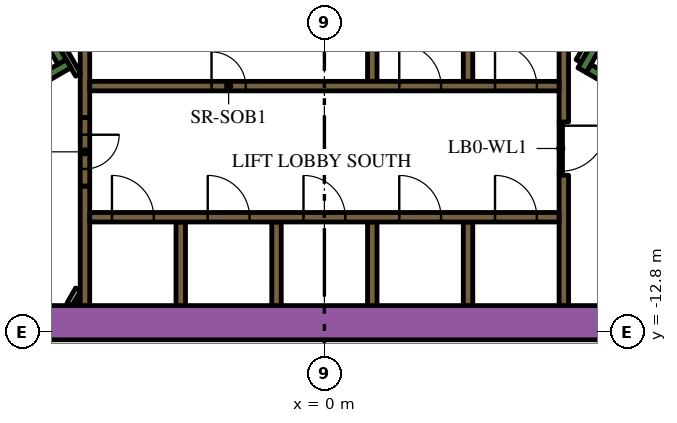
"""IFC4 building model, lengths in metres.
Left out: names, types, materials, properties, quantities, classifications, styles, units other than length and angle.
Written with IfcOpenShell. Run it as: python <this file> out.ifc"""

import sys

from ifc_helpers import new_model, si_unit, direction, frame, frame_2d, origin, place, context, subcontext, project, spatial, rectangle, extrude, element, fill, save


model = new_model("IFC4")
c1 = context("Model", 3, precision=1e-05, world=origin(), true_north=direction((0.0, 1.0)))
c2 = subcontext(c1, "Body", "Model", "MODEL_VIEW")
j1 = project(units=[si_unit("LENGTHUNIT", "METRE"), si_unit("PLANEANGLEUNIT", "RADIAN")], contexts=[c1])
p1 = place(None, origin())
s1 = spatial("IfcSite", under=j1, at=p1, CompositionType="ELEMENT")
p2 = place(p1, origin())
s2 = spatial("IfcBuilding", under=s1, at=p2, CompositionType="ELEMENT")
p3 = place(p2, frame((0.0, 0.0, 95.4)))
s3 = spatial("IfcBuildingStorey", under=s2, at=p3, CompositionType="ELEMENT", Elevation=95.4)
p4 = place(p3, frame((-12.019, -12.55, 0.0), z_axis=(0.0, 0.0, 1.0), x_axis=(1.0, 0.0, 0.0)))
e1 = element("IfcWall", 1, at=p4, inside=s3, PredefinedType="SOLIDWALL", context=c2, shape_type="SweptSolid", body=[
    extrude(rectangle(XDim=21.63, YDim=0.9, at=frame_2d((10.815, 0.0))), origin(), (0.0, 0.0, 1.0), 3.9),
])
p5 = place(p3, frame((12.84, -9.261, 0.0), z_axis=(0.0, 0.0, 1.0), x_axis=(-0.866013990052, 0.500019768644, 0.0)))
e2 = element("IfcWall", 2, at=p5, inside=s3, PredefinedType="SOLIDWALL", context=c2, shape_type="SweptSolid", body=[
    extrude(rectangle(XDim=6.8, YDim=0.25, at=frame_2d((3.4, 0.0))), origin(), (0.0, 0.0, 1.0), 3.9),
])
p6 = place(p3, frame((6.78, -5.906, 0.0), z_axis=(0.0, 0.0, 1.0), x_axis=(0.500223362819, 0.865896406789, 0.0)))
e3 = element("IfcWall", 3, at=p6, inside=s3, PredefinedType="SOLIDWALL", context=c2, shape_type="SweptSolid", body=[
    extrude(rectangle(XDim=0.675, YDim=0.25, at=frame_2d((0.337, 0.0))), origin(), (0.0, 0.0, 1.0), 3.9),
])
p7 = place(p3, frame((-12.84, -9.261, 0.0), z_axis=(0.0, 0.0, 1.0), x_axis=(0.866016039709, 0.500016218704, 0.0)))
e4 = element("IfcWall", 4, at=p7, inside=s3, PredefinedType="SOLIDWALL", context=c2, shape_type="SweptSolid", body=[
    extrude(rectangle(XDim=7.05, YDim=0.25, at=frame_2d((3.525, 0.0))), origin(), (0.0, 0.0, 1.0), 3.9),
])
p8 = place(p3, frame((-6.905, -5.69, 0.0), z_axis=(0.0, 0.0, 1.0), x_axis=(-0.500402024738, 0.865793170242, 0.0)))
e5 = element("IfcWall", 5, at=p8, inside=s3, PredefinedType="SOLIDWALL", context=c2, shape_type="SweptSolid", body=[
    extrude(rectangle(XDim=0.425, YDim=0.25, at=frame_2d((0.212, 0.0))), origin(), (0.0, 0.0, 1.0), 3.9),
])
p9 = place(p3, frame((-3.78, -12.1, 0.0), z_axis=(0.0, 0.0, 1.0), x_axis=(0.0, 1.0, 0.0)))
e6 = element("IfcWall", 6, at=p9, inside=s3, PredefinedType="SOLIDWALL", context=c2, shape_type="SweptSolid", body=[
    extrude(rectangle(XDim=2.2, YDim=0.25, at=frame_2d((1.1, 0.0))), origin(), (0.0, 0.0, 1.0), 3.9),
])
p10 = place(p3, frame((-6.3, -12.1, 0.0), z_axis=(0.0, 0.0, 1.0), x_axis=(0.0, 1.0, 0.0)))
e7 = element("IfcWall", 7, at=p10, inside=s3, PredefinedType="SOLIDWALL", context=c2, shape_type="SweptSolid", body=[
    extrude(rectangle(XDim=3.146, YDim=0.25, at=frame_2d((1.573, 0.0))), origin(), (0.0, 0.0, 1.0), 3.9),
])
p11 = place(p3, frame((6.3, -8.67, 0.0), z_axis=(0.0, 0.0, 1.0), x_axis=(0.0, -1.0, 0.0)))
e8 = element("IfcWall", 8, at=p11, inside=s3, PredefinedType="SOLIDWALL", context=c2, shape_type="SweptSolid", body=[
    extrude(rectangle(XDim=3.43, YDim=0.25, at=frame_2d((1.715, 0.0))), origin(), (0.0, 0.0, 1.0), 3.9),
])
p12 = place(p3, frame((6.3, -7.268, 0.0), z_axis=(0.0, 0.0, 1.0), x_axis=(0.0, 1.0, 0.0)))
e9 = element("IfcWall", 9, at=p12, inside=s3, PredefinedType="SOLIDWALL", context=c2, shape_type="SweptSolid", body=[
    extrude(rectangle(XDim=3.268, YDim=0.25, at=frame_2d((1.634, 0.0))), origin(), (0.0, 0.0, 1.0), 3.9),
])
for number, where, z_axis, x_axis in (
    (10, (3.78, -4.0, 0.0), (0.0, 0.0, 1.0), (0.0, -1.0, 0.0)),
    (11, (1.26, -4.0, 0.0), (0.0, 0.0, 1.0), (0.0, -1.0, 0.0)),
):
    element("IfcWall", number, at=place(p3, frame(where, z_axis=z_axis, x_axis=x_axis)), inside=s3, PredefinedType="SOLIDWALL", context=c2, shape_type="SweptSolid", body=[
        extrude(rectangle(XDim=2.2, YDim=0.25, at=frame_2d((1.1, 0.0))), origin(), (0.0, 0.0, 1.0), 3.9),
    ])
p13 = place(p3, frame((-6.3, -4.0, 0.0), z_axis=(0.0, 0.0, 1.0), x_axis=(0.0, -1.0, 0.0)))
e12 = element("IfcWall", 12, at=p13, inside=s3, PredefinedType="SOLIDWALL", context=c2, shape_type="SweptSolid", body=[
    extrude(rectangle(XDim=3.154, YDim=0.25, at=frame_2d((1.577, 0.0))), origin(), (0.0, 0.0, 1.0), 3.9),
])
for number, where, z_axis, x_axis in (
    (13, (3.78, -12.1, 0.0), (0.0, 0.0, 1.0), (0.0, 1.0, 0.0)),
    (14, (1.26, -12.1, 0.0), (0.0, 0.0, 1.0), (0.0, 1.0, 0.0)),
    (15, (-1.26, -12.1, 0.0), (0.0, 0.0, 1.0), (0.0, 1.0, 0.0)),
):
    element("IfcWall", number, at=place(p3, frame(where, z_axis=z_axis, x_axis=x_axis)), inside=s3, PredefinedType="SOLIDWALL", context=c2, shape_type="SweptSolid", body=[
        extrude(rectangle(XDim=2.2, YDim=0.25, at=frame_2d((1.1, 0.0))), origin(), (0.0, 0.0, 1.0), 3.9),
    ])
p14 = place(p3, frame((-6.708, -12.068, 0.0), z_axis=(0.0, 0.0, 1.0), x_axis=(0.500000789788, 0.8660249478, 0.0)))
e16 = element("IfcWall", 16, at=p14, inside=s3, PredefinedType="PARTITIONING", context=c2, shape_type="SweptSolid", body=[
    extrude(rectangle(XDim=0.456, YDim=0.15, at=frame_2d((0.228, 0.0))), origin(), (0.0, 0.0, 1.0), 2.75),
])
p15 = place(p3, frame((-6.534, -12.068, 0.0), z_axis=(0.0, 0.0, 1.0), x_axis=(0.500240224089, 0.865886665912, 0.0)))
e17 = element("IfcWall", 17, at=p15, inside=s3, PredefinedType="PARTITIONING", context=c2, shape_type="SweptSolid", body=[
    extrude(rectangle(XDim=0.109, YDim=0.15, at=frame_2d((0.054, 0.0))), origin(), (0.0, 0.0, 1.0), 2.75),
])
p16 = place(p3, frame((-6.48, -6.027, 0.0), z_axis=(0.0, 0.0, 1.0), x_axis=(-0.499927229454, 0.866067413802, 0.0)))
e18 = element("IfcWall", 18, at=p16, inside=s3, PredefinedType="PARTITIONING", context=c2, shape_type="SweptSolid", body=[
    extrude(rectangle(XDim=0.929, YDim=0.15, at=frame_2d((0.464, 0.0))), origin(), (0.0, 0.0, 1.0), 3.9),
])
p17 = place(p3, frame((6.945, -5.222, 0.0), z_axis=(0.0, 0.0, 1.0), x_axis=(-0.499818422106, -0.866130212453, 0.0)))
e19 = element("IfcWall", 19, at=p17, inside=s3, PredefinedType="PARTITIONING", context=c2, shape_type="SweptSolid", body=[
    extrude(rectangle(XDim=0.514, YDim=0.15, at=frame_2d((0.257, 0.0))), origin(), (0.0, 0.0, 1.0), 2.75),
])
p18 = place(p3, frame((-6.175, -9.775, 0.0), z_axis=(0.0, 0.0, 1.0), x_axis=(1.0, 0.0, 0.0)))
e20 = element("IfcWall", 20, at=p18, inside=s3, PredefinedType="SOLIDWALL", context=c2, shape_type="SweptSolid", body=[
    extrude(rectangle(XDim=12.35, YDim=0.25, at=frame_2d((6.175, 0.0))), origin(), (0.0, 0.0, 1.0), 3.9),
])
p19 = place(p18, frame((0.585, 0.0, 0.0)))
e21 = element("IfcOpeningElement", 21, at=p19, cuts=e20, PredefinedType="OPENING", context=c2, shape_type="SweptSolid", body=[
    extrude(rectangle(XDim=1.1, YDim=2.1, at=frame_2d((0.55, 1.05))), frame((0.0, 0.135, 0.0), z_axis=(0.0, -1.0, 0.0), x_axis=(1.0, 0.0, 0.0)), (0.0, 0.0, 1.0), 0.27),
])
p20 = place(p18, frame((3.105, 0.0, 0.0)))
e22 = element("IfcOpeningElement", 22, at=p20, cuts=e20, PredefinedType="OPENING", context=c2, shape_type="SweptSolid", body=[
    extrude(rectangle(XDim=1.1, YDim=2.1, at=frame_2d((0.55, 1.05))), frame((0.0, 0.135, 0.0), z_axis=(0.0, -1.0, 0.0), x_axis=(1.0, 0.0, 0.0)), (0.0, 0.0, 1.0), 0.27),
])
p21 = place(p18, frame((5.625, 0.0, 0.0)))
e23 = element("IfcOpeningElement", 23, at=p21, cuts=e20, PredefinedType="OPENING", context=c2, shape_type="SweptSolid", body=[
    extrude(rectangle(XDim=1.1, YDim=2.1, at=frame_2d((0.55, 1.05))), frame((0.0, 0.135, 0.0), z_axis=(0.0, -1.0, 0.0), x_axis=(1.0, 0.0, 0.0)), (0.0, 0.0, 1.0), 0.27),
])
p22 = place(p18, frame((8.145, 0.0, 0.0)))
e24 = element("IfcOpeningElement", 24, at=p22, cuts=e20, PredefinedType="OPENING", context=c2, shape_type="SweptSolid", body=[
    extrude(rectangle(XDim=1.1, YDim=2.1, at=frame_2d((0.55, 1.05))), frame((0.0, 0.135, 0.0), z_axis=(0.0, -1.0, 0.0), x_axis=(1.0, 0.0, 0.0)), (0.0, 0.0, 1.0), 0.27),
])
p23 = place(p18, frame((10.665, 0.0, 0.0)))
e25 = element("IfcOpeningElement", 25, at=p23, cuts=e20, PredefinedType="OPENING", context=c2, shape_type="SweptSolid", body=[
    extrude(rectangle(XDim=1.1, YDim=2.1, at=frame_2d((0.55, 1.05))), frame((0.0, 0.135, 0.0), z_axis=(0.0, -1.0, 0.0), x_axis=(1.0, 0.0, 0.0)), (0.0, 0.0, 1.0), 0.27),
])
p24 = place(p3, frame((-6.175, -6.325, 0.0), z_axis=(0.0, 0.0, 1.0), x_axis=(1.0, 0.0, 0.0)))
e26 = element("IfcWall", 26, at=p24, inside=s3, PredefinedType="SOLIDWALL", context=c2, shape_type="SweptSolid", body=[
    extrude(rectangle(XDim=12.35, YDim=0.25, at=frame_2d((6.175, 0.0))), origin(), (0.0, 0.0, 1.0), 3.9),
])
p25 = place(p24, frame((3.205, 0.0, 0.0)))
e27 = element("IfcOpeningElement", 27, at=p25, cuts=e26, PredefinedType="OPENING", context=c2, shape_type="SweptSolid", body=[
    extrude(rectangle(XDim=0.9, YDim=2.1, at=frame_2d((0.45, 1.05))), frame((0.0, 0.135, 0.0), z_axis=(0.0, -1.0, 0.0), x_axis=(1.0, 0.0, 0.0)), (0.0, 0.0, 1.0), 0.27),
])
p26 = place(p24, frame((8.145, 0.0, 0.0)))
e28 = element("IfcOpeningElement", 28, at=p26, cuts=e26, PredefinedType="OPENING", context=c2, shape_type="SweptSolid", body=[
    extrude(rectangle(XDim=1.1, YDim=2.1, at=frame_2d((0.55, 1.05))), frame((0.0, 0.135, 0.0), z_axis=(0.0, -1.0, 0.0), x_axis=(1.0, 0.0, 0.0)), (0.0, 0.0, 1.0), 0.27),
])
p27 = place(p24, frame((10.665, 0.0, 0.0)))
e29 = element("IfcOpeningElement", 29, at=p27, cuts=e26, PredefinedType="OPENING", context=c2, shape_type="SweptSolid", body=[
    extrude(rectangle(XDim=1.1, YDim=2.1, at=frame_2d((0.55, 1.05))), frame((0.0, 0.135, 0.0), z_axis=(0.0, -1.0, 0.0), x_axis=(1.0, 0.0, 0.0)), (0.0, 0.0, 1.0), 0.27),
])
p28 = place(p3, frame((-6.3, -7.154, 0.0), z_axis=(0.0, 0.0, 1.0), x_axis=(0.0, -1.0, 0.0)))
e30 = element("IfcWall", 30, at=p28, inside=s3, PredefinedType="SOLIDWALL", context=c2, shape_type="SweptSolid", body=[
    extrude(rectangle(XDim=1.8, YDim=0.25, at=frame_2d((0.9, 0.0))), origin(), (0.0, 0.0, 1.0), 3.9),
])
p29 = place(p28, frame((0.45, 0.0, 0.0)))
e31 = element("IfcOpeningElement", 31, at=p29, cuts=e30, PredefinedType="OPENING", context=c2, shape_type="SweptSolid", body=[
    extrude(rectangle(XDim=0.9, YDim=2.1, at=frame_2d((0.45, 1.05))), frame((0.0, 0.135, 0.0), z_axis=(0.0, -1.0, 0.0), x_axis=(1.0, 0.0, 0.0)), (0.0, 0.0, 1.0), 0.27),
])
p30 = place(p3, frame((6.22, -7.266, 0.0), z_axis=(0.0, 0.0, 1.0), x_axis=(0.0, -1.0, 0.0)))
e32 = element("IfcWall", 32, at=p30, inside=s3, PredefinedType="PARTITIONING", context=c2, shape_type="SweptSolid", body=[
    extrude(rectangle(XDim=1.4, YDim=0.09, at=frame_2d((0.7, 0.0))), origin(), (0.0, 0.0, 1.0), 2.75),
])
p31 = place(p30, frame((0.1, 0.0, 0.0)))
e33 = element("IfcOpeningElement", 33, at=p31, cuts=e32, PredefinedType="OPENING", context=c2, shape_type="SweptSolid", body=[
    extrude(rectangle(XDim=1.2, YDim=2.1, at=frame_2d((0.6, 1.05))), frame((0.0, 0.055, 0.0), z_axis=(0.0, -1.0, 0.0), x_axis=(1.0, 0.0, 0.0)), (0.0, 0.0, 1.0), 0.11),
])
p32 = place(p19, origin())
e34 = element("IfcDoor", 34, at=p32, inside=s3, OperationType="DOUBLE_DOOR_SLIDING", PredefinedType="DOOR", context=c2, shape_type="SweptSolid", body=[
    extrude(rectangle(XDim=1.1, YDim=2.1, at=frame_2d((0.55, 1.05))), frame((0.0, 0.025, 0.0), z_axis=(0.0, -1.0, 0.0), x_axis=(1.0, 0.0, 0.0)), (0.0, 0.0, 1.0), 0.05),
])
fill(e21, e34)
p33 = place(p20, origin())
e35 = element("IfcDoor", 35, at=p33, inside=s3, OperationType="DOUBLE_DOOR_SLIDING", PredefinedType="DOOR", context=c2, shape_type="SweptSolid", body=[
    extrude(rectangle(XDim=1.1, YDim=2.1, at=frame_2d((0.55, 1.05))), frame((0.0, 0.025, 0.0), z_axis=(0.0, -1.0, 0.0), x_axis=(1.0, 0.0, 0.0)), (0.0, 0.0, 1.0), 0.05),
])
fill(e22, e35)
p34 = place(p21, origin())
e36 = element("IfcDoor", 36, at=p34, inside=s3, OperationType="DOUBLE_DOOR_SLIDING", PredefinedType="DOOR", context=c2, shape_type="SweptSolid", body=[
    extrude(rectangle(XDim=1.1, YDim=2.1, at=frame_2d((0.55, 1.05))), frame((0.0, 0.025, 0.0), z_axis=(0.0, -1.0, 0.0), x_axis=(1.0, 0.0, 0.0)), (0.0, 0.0, 1.0), 0.05),
])
fill(e23, e36)
p35 = place(p22, origin())
e37 = element("IfcDoor", 37, at=p35, inside=s3, OperationType="DOUBLE_DOOR_SLIDING", PredefinedType="DOOR", context=c2, shape_type="SweptSolid", body=[
    extrude(rectangle(XDim=1.1, YDim=2.1, at=frame_2d((0.55, 1.05))), frame((0.0, 0.025, 0.0), z_axis=(0.0, -1.0, 0.0), x_axis=(1.0, 0.0, 0.0)), (0.0, 0.0, 1.0), 0.05),
])
fill(e24, e37)
p36 = place(p23, origin())
e38 = element("IfcDoor", 38, at=p36, inside=s3, OperationType="DOUBLE_DOOR_SLIDING", PredefinedType="DOOR", context=c2, shape_type="SweptSolid", body=[
    extrude(rectangle(XDim=1.1, YDim=2.1, at=frame_2d((0.55, 1.05))), frame((0.0, 0.025, 0.0), z_axis=(0.0, -1.0, 0.0), x_axis=(1.0, 0.0, 0.0)), (0.0, 0.0, 1.0), 0.05),
])
fill(e25, e38)
p37 = place(p25, origin())
e39 = element("IfcDoor", 39, at=p37, inside=s3, OperationType="SINGLE_SWING_LEFT", PredefinedType="DOOR", context=c2, shape_type="SweptSolid", body=[
    extrude(rectangle(XDim=0.9, YDim=2.1, at=frame_2d((0.45, 1.05))), frame((0.0, 0.025, 0.0), z_axis=(0.0, -1.0, 0.0), x_axis=(1.0, 0.0, 0.0)), (0.0, 0.0, 1.0), 0.05),
])
fill(e27, e39)
p38 = place(p26, origin())
e40 = element("IfcDoor", 40, at=p38, inside=s3, OperationType="DOUBLE_DOOR_SLIDING", PredefinedType="DOOR", context=c2, shape_type="SweptSolid", body=[
    extrude(rectangle(XDim=1.1, YDim=2.1, at=frame_2d((0.55, 1.05))), frame((0.0, 0.025, 0.0), z_axis=(0.0, -1.0, 0.0), x_axis=(1.0, 0.0, 0.0)), (0.0, 0.0, 1.0), 0.05),
])
fill(e28, e40)
p39 = place(p27, origin())
e41 = element("IfcDoor", 41, at=p39, inside=s3, OperationType="DOUBLE_DOOR_SLIDING", PredefinedType="DOOR", context=c2, shape_type="SweptSolid", body=[
    extrude(rectangle(XDim=1.1, YDim=2.1, at=frame_2d((0.55, 1.05))), frame((0.0, 0.025, 0.0), z_axis=(0.0, -1.0, 0.0), x_axis=(1.0, 0.0, 0.0)), (0.0, 0.0, 1.0), 0.05),
])
fill(e29, e41)
p40 = place(p29, origin())
e42 = element("IfcDoor", 42, at=p40, inside=s3, OperationType="SINGLE_SWING_LEFT", PredefinedType="DOOR", context=c2, shape_type="SweptSolid", body=[
    extrude(rectangle(XDim=0.9, YDim=2.1, at=frame_2d((0.45, 1.05))), frame((0.0, 0.025, 0.0), z_axis=(0.0, -1.0, 0.0), x_axis=(1.0, 0.0, 0.0)), (0.0, 0.0, 1.0), 0.05),
])
fill(e31, e42)
p41 = place(p31, origin())
e43 = element("IfcDoor", 43, at=p41, inside=s3, OperationType="SINGLE_SWING_LEFT", PredefinedType="DOOR", context=c2, shape_type="SweptSolid", body=[
    extrude(rectangle(XDim=1.2, YDim=2.1, at=frame_2d((0.6, 1.05))), frame((0.0, 0.025, 0.0), z_axis=(0.0, -1.0, 0.0), x_axis=(1.0, 0.0, 0.0)), (0.0, 0.0, 1.0), 0.05),
])
fill(e33, e43)
save(model, sys.argv[1])
